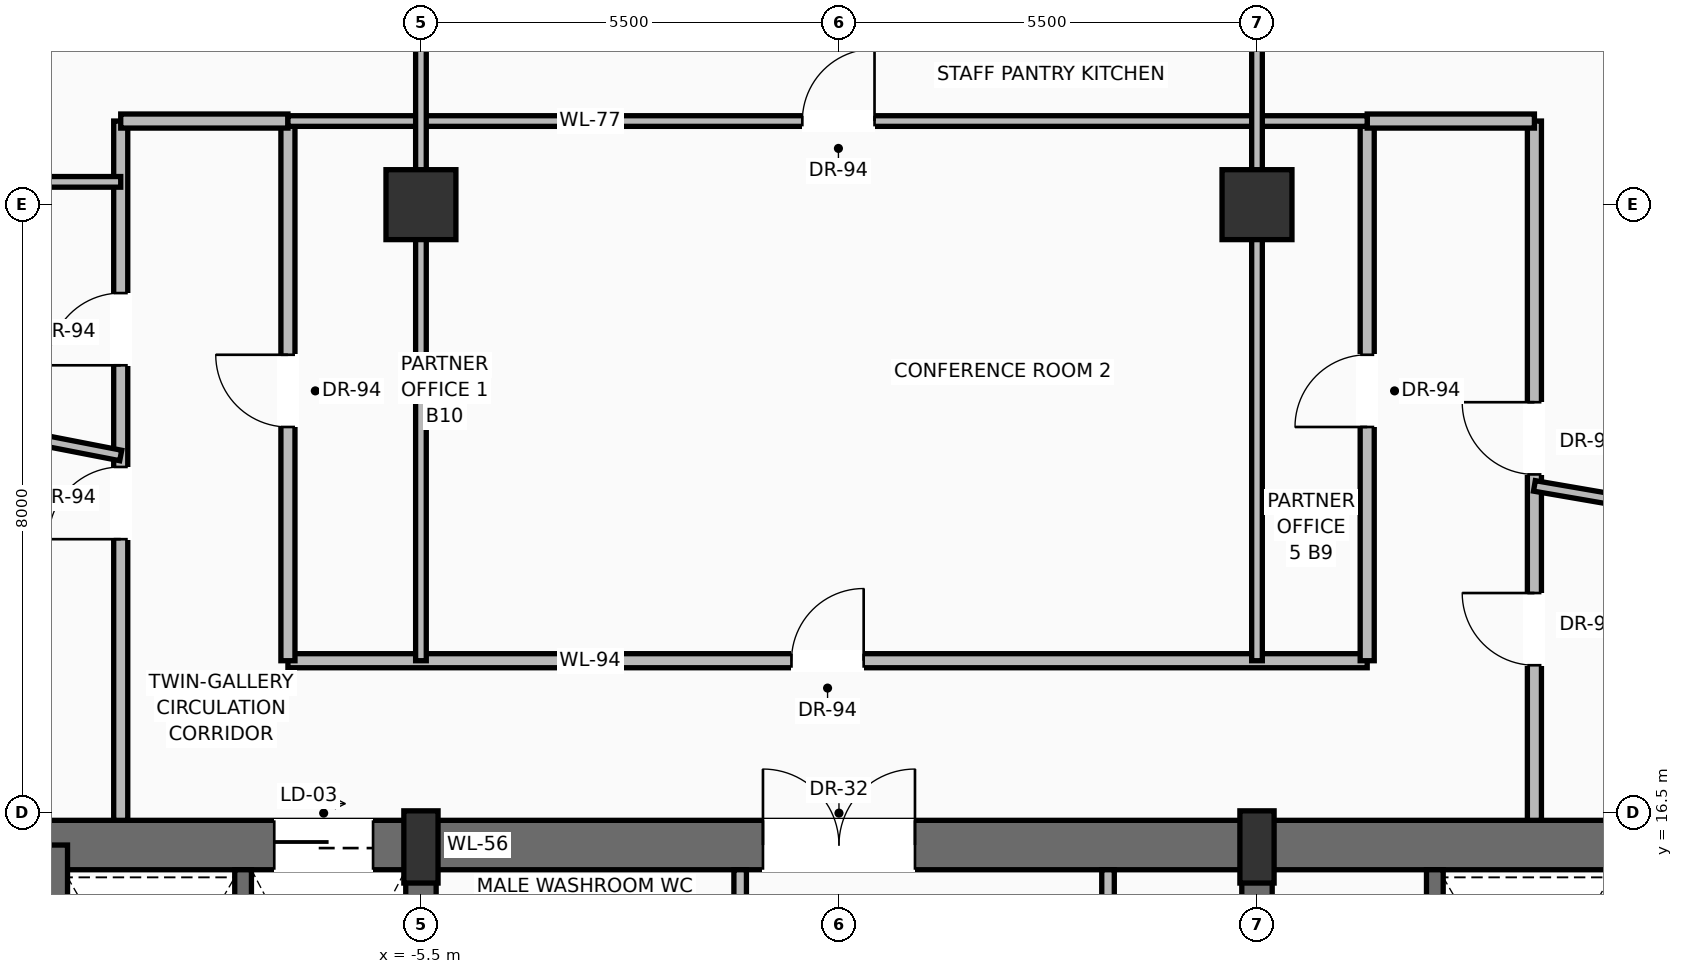
"""IFC4 building model, lengths in metres.
Left out: names, types, materials, properties, quantities, classifications, styles, units other than length and angle.
Written with IfcOpenShell. Run it as: python <this file> out.ifc"""

import sys

from ifc_helpers import new_model, si_unit, direction, frame, frame_2d, origin, origin_2d, place, context, subcontext, project, spatial, rectangle, extrude, source, transform, mapped, element, fill, save


model = new_model("IFC4")
c1 = context("Model", 3, precision=1e-05, world=origin(), true_north=direction((0.0, 1.0)))
c2 = subcontext(c1, "Body", "Model", "MODEL_VIEW")
j1 = project(units=[si_unit("LENGTHUNIT", "METRE"), si_unit("PLANEANGLEUNIT", "RADIAN")], contexts=[c1])
p1 = place(None, origin())
s1 = spatial("IfcSite", under=j1, at=p1, CompositionType="ELEMENT")
p2 = place(p1, origin())
s2 = spatial("IfcBuilding", under=s1, at=p2, CompositionType="ELEMENT")
p3 = place(p2, frame((0.0, 0.0, 182.1)))
s3 = spatial("IfcBuildingStorey", under=s2, at=p3, CompositionType="ELEMENT", Elevation=182.1)
p4 = place(p3, frame((-10.8, 16.075, 0.0), z_axis=(0.0, 0.0, 1.0), x_axis=(1.0, 0.0, 0.0)))
e1 = element("IfcWall", 1, at=p4, inside=s3, PredefinedType="SHEAR", context=c2, shape_type="SweptSolid", body=[
    extrude(rectangle(XDim=21.6, YDim=0.65, at=frame_2d((10.8, 0.0))), origin(), (0.0, 0.0, 1.0), 3.47),
])
p5 = place(p4, frame((3.37, 0.0, 0.0)))
e2 = element("IfcOpeningElement", 2, at=p5, cuts=e1, PredefinedType="OPENING", context=c2, shape_type="SweptSolid", body=[
    extrude(rectangle(XDim=1.3, YDim=2.3, at=frame_2d((0.65, 1.15))), frame((0.0, 0.335, 0.0), z_axis=(0.0, -1.0, 0.0), x_axis=(1.0, 0.0, 0.0)), (0.0, 0.0, 1.0), 0.67),
])
p6 = place(p4, frame((9.8, 0.0, 0.0)))
e3 = element("IfcOpeningElement", 3, at=p6, cuts=e1, PredefinedType="OPENING", context=c2, shape_type="SweptSolid", body=[
    extrude(rectangle(XDim=2.0, YDim=2.4, at=frame_2d((1.0, 1.2))), frame((0.0, 0.335, 0.0), z_axis=(0.0, -1.0, 0.0), x_axis=(1.0, 0.0, 0.0)), (0.0, 0.0, 1.0), 0.67),
])
p7 = place(p3, frame((-10.475, 0.525, 0.0), z_axis=(0.0, 0.0, 1.0), x_axis=(0.0, 1.0, 0.0)))
e4 = element("IfcWall", 4, at=p7, inside=s3, PredefinedType="SHEAR", context=c2, shape_type="SweptSolid", body=[
    extrude(rectangle(XDim=15.55, YDim=0.65, at=frame_2d((7.775, 0.0))), origin(), (0.0, 0.0, 1.0), 3.47),
])
p8 = place(p3, frame((-5.5, 0.525, 0.0), z_axis=(0.0, 0.0, 1.0), x_axis=(0.0, 1.0, 0.0)))
e5 = element("IfcWall", 5, at=p8, inside=s3, PredefinedType="SHEAR", context=c2, shape_type="SweptSolid", body=[
    extrude(rectangle(XDim=15.55, YDim=0.4, at=frame_2d((7.775, 0.0))), origin(), (0.0, 0.0, 1.0), 3.47),
])
p9 = place(p8, frame((8.975, 0.0, 0.0)))
e6 = element("IfcOpeningElement", 6, at=p9, cuts=e5, PredefinedType="OPENING", context=c2, shape_type="SweptSolid", body=[
    extrude(rectangle(XDim=1.1, YDim=2.2, at=frame_2d((0.55, 1.1))), frame((0.0, 0.21, 0.0), z_axis=(0.0, -1.0, 0.0), x_axis=(1.0, 0.0, 0.0)), (0.0, 0.0, 1.0), 0.42),
])
p10 = place(p3, frame((5.5, 0.525, 0.0), z_axis=(0.0, 0.0, 1.0), x_axis=(0.0, 1.0, 0.0)))
e7 = element("IfcWall", 7, at=p10, inside=s3, PredefinedType="SHEAR", context=c2, shape_type="SweptSolid", body=[
    extrude(rectangle(XDim=15.55, YDim=0.4, at=frame_2d((7.775, 0.0))), origin(), (0.0, 0.0, 1.0), 3.47),
])
p11 = place(p10, frame((8.975, 0.0, 0.0)))
e8 = element("IfcOpeningElement", 8, at=p11, cuts=e7, PredefinedType="OPENING", context=c2, shape_type="SweptSolid", body=[
    extrude(rectangle(XDim=1.1, YDim=2.2, at=frame_2d((0.55, 1.1))), frame((0.0, 0.21, 0.0), z_axis=(0.0, -1.0, 0.0), x_axis=(1.0, 0.0, 0.0)), (0.0, 0.0, 1.0), 0.42),
])
m1 = source(origin(), c2, "Body", "SweptSolid", [
    extrude(rectangle(XDim=0.45, YDim=0.95, at=origin_2d()), origin(), (0.0, 0.0, 1.0), 3.7),
])
for number, where, z_axis, x_axis in (
    (9, (-5.5, 16.05, 0.0), (0.0, 0.0, 1.0), (1.0, 0.0, 0.0)),
    (10, (5.5, 16.05, 0.0), (0.0, 0.0, 1.0), (1.0, 0.0, 0.0)),
):
    element("IfcColumn", number, at=place(p3, frame(where, z_axis=z_axis, x_axis=x_axis)), inside=s3, PredefinedType="PILASTER", context=c2, shape_type="MappedRepresentation", body=[
        mapped(m1, transform((0.0, 0.0, 0.0), scale=1.0)),
    ])
m2 = source(origin(), c2, "Body", "SweptSolid", [
    extrude(rectangle(XDim=0.92, YDim=0.92, at=origin_2d()), origin(), (0.0, 0.0, 1.0), 3.7),
])
for number, where, z_axis, x_axis in (
    (11, (-5.5, 24.5, 0.0), (0.0, 0.0, 1.0), (1.0, 0.0, 0.0)),
    (12, (5.5, 24.5, 0.0), (0.0, 0.0, 1.0), (1.0, 0.0, 0.0)),
):
    element("IfcColumn", number, at=place(p3, frame(where, z_axis=z_axis, x_axis=x_axis)), inside=s3, PredefinedType="COLUMN", context=c2, shape_type="MappedRepresentation", body=[
        mapped(m2, transform((0.0, 0.0, 0.0), scale=1.0)),
    ])
p12 = place(p3, frame((-20.423, 16.362, 0.0), z_axis=(0.0, 0.0, 1.0), x_axis=(0.528858297752, 0.848710139505, 0.0)))
e13 = element("IfcWall", 13, at=p12, inside=s3, PredefinedType="SOLIDWALL", context=c2, shape_type="SweptSolid", body=[
    extrude(rectangle(XDim=18.863, YDim=0.28, at=frame_2d((9.431, 0.0))), origin(), (0.0, 0.0, 1.0), 3.05),
])
p13 = place(p12, frame((4.527, 0.0, 0.0)))
e14 = element("IfcOpeningElement", 14, at=p13, cuts=e13, PredefinedType="OPENING", context=c2, shape_type="SweptSolid", body=[
    extrude(rectangle(XDim=1.6, YDim=2.35, at=frame_2d((0.8, 1.175))), frame((0.0, 0.15, 0.0), z_axis=(0.0, -1.0, 0.0), x_axis=(1.0, 0.0, 0.0)), (0.0, 0.0, 1.0), 0.3),
])
p14 = place(p12, frame((12.826, 0.0, 0.9)))
e15 = element("IfcOpeningElement", 15, at=p14, cuts=e13, PredefinedType="OPENING", context=c2, shape_type="SweptSolid", body=[
    extrude(rectangle(XDim=2.0, YDim=1.85, at=frame_2d((1.0, 0.925))), frame((0.0, 0.15, 0.0), z_axis=(0.0, -1.0, 0.0), x_axis=(1.0, 0.0, 0.0)), (0.0, 0.0, 1.0), 0.3),
])
p15 = place(p3, frame((10.054, 32.443, 0.0), z_axis=(0.0, 0.0, 1.0), x_axis=(0.535358537379, -0.844624908735, 0.0)))
e16 = element("IfcWall", 16, at=p15, inside=s3, PredefinedType="SOLIDWALL", context=c2, shape_type="SweptSolid", body=[
    extrude(rectangle(XDim=18.818, YDim=0.28, at=frame_2d((9.409, 0.0))), origin(), (0.0, 0.0, 1.0), 3.05),
])
p16 = place(p15, frame((4.516, 0.0, 0.0)))
e17 = element("IfcOpeningElement", 17, at=p16, cuts=e16, PredefinedType="OPENING", context=c2, shape_type="SweptSolid", body=[
    extrude(rectangle(XDim=1.6, YDim=2.35, at=frame_2d((0.8, 1.175))), frame((0.0, 0.15, 0.0), z_axis=(0.0, -1.0, 0.0), x_axis=(1.0, 0.0, 0.0)), (0.0, 0.0, 1.0), 0.3),
])
p17 = place(p15, frame((12.796, 0.0, 0.9)))
e18 = element("IfcOpeningElement", 18, at=p17, cuts=e16, PredefinedType="OPENING", context=c2, shape_type="SweptSolid", body=[
    extrude(rectangle(XDim=2.0, YDim=1.85, at=frame_2d((1.0, 0.925))), frame((0.0, 0.15, 0.0), z_axis=(0.0, -1.0, 0.0), x_axis=(1.0, 0.0, 0.0)), (0.0, 0.0, 1.0), 0.3),
])
for number, where, z_axis, x_axis in (
    (19, (-7.84, 11.87, 0.0), (0.0, 0.0, 1.0), (0.0, 1.0, 0.0)),
    (20, (7.84, 11.87, 0.0), (0.0, 0.0, 1.0), (0.0, 1.0, 0.0)),
):
    element("IfcWall", number, at=place(p3, frame(where, z_axis=z_axis, x_axis=x_axis)), inside=s3, PredefinedType="SOLIDWALL", context=c2, shape_type="SweptSolid", body=[
        extrude(rectangle(XDim=3.88, YDim=0.22, at=frame_2d((1.94, 0.0))), origin(), (0.0, 0.0, 1.0), 3.47),
    ])
p18 = place(p3, frame((-1.3, 13.6, 0.0), z_axis=(0.0, 0.0, 1.0), x_axis=(0.0, 1.0, 0.0)))
e21 = element("IfcWall", 21, at=p18, inside=s3, PredefinedType="PARTITIONING", context=c2, shape_type="SweptSolid", body=[
    extrude(rectangle(XDim=2.15, YDim=0.165, at=frame_2d((1.075, 0.0))), origin(), (0.0, 0.0, 1.0), 3.462),
])
p19 = place(p18, frame((0.55, 0.0, 0.0)))
e22 = element("IfcOpeningElement", 22, at=p19, cuts=e21, PredefinedType="OPENING", context=c2, shape_type="SweptSolid", body=[
    extrude(rectangle(XDim=0.9, YDim=2.1, at=frame_2d((0.45, 1.05))), frame((0.0, 0.093, 0.0), z_axis=(0.0, -1.0, 0.0), x_axis=(1.0, 0.0, 0.0)), (0.0, 0.0, 1.0), 0.185),
])
p20 = place(p3, frame((3.54, 11.22, 0.0), z_axis=(0.0, 0.0, 1.0), x_axis=(0.0, 1.0, 0.0)))
e23 = element("IfcWall", 23, at=p20, inside=s3, PredefinedType="PARTITIONING", context=c2, shape_type="SweptSolid", body=[
    extrude(rectangle(XDim=4.53, YDim=0.165, at=frame_2d((2.265, 0.0))), origin(), (0.0, 0.0, 1.0), 3.462),
])
p21 = place(p20, frame((1.25, 0.0, 0.0)))
e24 = element("IfcOpeningElement", 24, at=p21, cuts=e23, PredefinedType="OPENING", context=c2, shape_type="SweptSolid", body=[
    extrude(rectangle(XDim=0.9, YDim=2.1, at=frame_2d((0.45, 1.05))), frame((0.0, 0.093, 0.0), z_axis=(0.0, -1.0, 0.0), x_axis=(1.0, 0.0, 0.0)), (0.0, 0.0, 1.0), 0.185),
])
p22 = place(p3, frame((-7.25, 18.5, 0.0), z_axis=(0.0, 0.0, 1.0), x_axis=(1.0, 0.0, 0.0)))
e25 = element("IfcWall", 25, at=p22, inside=s3, PredefinedType="PARTITIONING", context=c2, shape_type="SweptSolid", body=[
    extrude(rectangle(XDim=14.2, YDim=0.185, at=frame_2d((7.1, 0.0))), origin(), (0.0, 0.0, 1.0), 2.846),
])
p23 = place(p22, frame((6.625, 0.0, 0.0)))
e26 = element("IfcOpeningElement", 26, at=p23, cuts=e25, PredefinedType="OPENING", context=c2, shape_type="SweptSolid", body=[
    extrude(rectangle(XDim=0.95, YDim=2.2, at=frame_2d((0.475, 1.1))), frame((0.0, 0.103, 0.0), z_axis=(0.0, -1.0, 0.0), x_axis=(1.0, 0.0, 0.0)), (0.0, 0.0, 1.0), 0.205),
])
p24 = place(p3, frame((-7.25, 18.5, 0.0), z_axis=(0.0, 0.0, 1.0), x_axis=(0.0, 1.0, 0.0)))
e27 = element("IfcWall", 27, at=p24, inside=s3, PredefinedType="PARTITIONING", context=c2, shape_type="SweptSolid", body=[
    extrude(rectangle(XDim=7.1, YDim=0.185, at=frame_2d((3.55, 0.0))), origin(), (0.0, 0.0, 1.0), 2.846),
])
p25 = place(p24, frame((3.075, 0.0, 0.0)))
e28 = element("IfcOpeningElement", 28, at=p25, cuts=e27, PredefinedType="OPENING", context=c2, shape_type="SweptSolid", body=[
    extrude(rectangle(XDim=0.95, YDim=2.2, at=frame_2d((0.475, 1.1))), frame((0.0, 0.103, 0.0), z_axis=(0.0, -1.0, 0.0), x_axis=(1.0, 0.0, 0.0)), (0.0, 0.0, 1.0), 0.205),
])
p26 = place(p3, frame((6.95, 18.5, 0.0), z_axis=(0.0, 0.0, 1.0), x_axis=(0.0, 1.0, 0.0)))
e29 = element("IfcWall", 29, at=p26, inside=s3, PredefinedType="PARTITIONING", context=c2, shape_type="SweptSolid", body=[
    extrude(rectangle(XDim=7.1, YDim=0.185, at=frame_2d((3.55, 0.0))), origin(), (0.0, 0.0, 1.0), 2.846),
])
p27 = place(p26, frame((3.075, 0.0, 0.0)))
e30 = element("IfcOpeningElement", 30, at=p27, cuts=e29, PredefinedType="OPENING", context=c2, shape_type="SweptSolid", body=[
    extrude(rectangle(XDim=0.95, YDim=2.2, at=frame_2d((0.475, 1.1))), frame((0.0, 0.103, 0.0), z_axis=(0.0, -1.0, 0.0), x_axis=(1.0, 0.0, 0.0)), (0.0, 0.0, 1.0), 0.205),
])
p28 = place(p3, frame((-9.45, 16.4, 0.0), z_axis=(0.0, 0.0, 1.0), x_axis=(0.0, 1.0, 0.0)))
e31 = element("IfcWall", 31, at=p28, inside=s3, PredefinedType="PARTITIONING", context=c2, shape_type="SweptSolid", body=[
    extrude(rectangle(XDim=9.2, YDim=0.185, at=frame_2d((4.6, 0.0))), origin(), (0.0, 0.0, 1.0), 2.846),
])
p29 = place(p28, frame((3.699, 0.0, 0.0)))
e32 = element("IfcOpeningElement", 32, at=p29, cuts=e31, PredefinedType="OPENING", context=c2, shape_type="SweptSolid", body=[
    extrude(rectangle(XDim=0.95, YDim=2.2, at=frame_2d((0.475, 1.1))), frame((0.0, 0.103, 0.0), z_axis=(0.0, -1.0, 0.0), x_axis=(1.0, 0.0, 0.0)), (0.0, 0.0, 1.0), 0.205),
])
p30 = place(p28, frame((5.987, 0.0, 0.0)))
e33 = element("IfcOpeningElement", 33, at=p30, cuts=e31, PredefinedType="OPENING", context=c2, shape_type="SweptSolid", body=[
    extrude(rectangle(XDim=0.95, YDim=2.2, at=frame_2d((0.475, 1.1))), frame((0.0, 0.103, 0.0), z_axis=(0.0, -1.0, 0.0), x_axis=(1.0, 0.0, 0.0)), (0.0, 0.0, 1.0), 0.205),
])
p31 = place(p3, frame((9.15, 16.4, 0.0), z_axis=(0.0, 0.0, 1.0), x_axis=(0.0, 1.0, 0.0)))
e34 = element("IfcWall", 34, at=p31, inside=s3, PredefinedType="PARTITIONING", context=c2, shape_type="SweptSolid", body=[
    extrude(rectangle(XDim=9.2, YDim=0.185, at=frame_2d((4.6, 0.0))), origin(), (0.0, 0.0, 1.0), 2.846),
])
p32 = place(p31, frame((4.551, 0.0, 0.0)))
e35 = element("IfcOpeningElement", 35, at=p32, cuts=e34, PredefinedType="OPENING", context=c2, shape_type="SweptSolid", body=[
    extrude(rectangle(XDim=0.95, YDim=2.2, at=frame_2d((0.475, 1.1))), frame((0.0, 0.103, 0.0), z_axis=(0.0, -1.0, 0.0), x_axis=(1.0, 0.0, 0.0)), (0.0, 0.0, 1.0), 0.205),
])
p33 = place(p31, frame((2.041, 0.0, 0.0)))
e36 = element("IfcOpeningElement", 36, at=p33, cuts=e34, PredefinedType="OPENING", context=c2, shape_type="SweptSolid", body=[
    extrude(rectangle(XDim=0.95, YDim=2.2, at=frame_2d((0.475, 1.1))), frame((0.0, 0.103, 0.0), z_axis=(0.0, -1.0, 0.0), x_axis=(1.0, 0.0, 0.0)), (0.0, 0.0, 1.0), 0.205),
])
for number, where, z_axis, x_axis in (
    (37, (-9.45, 25.6, 0.0), (0.0, 0.0, 1.0), (1.0, 0.0, 0.0)),
    (38, (6.95, 25.6, 0.0), (0.0, 0.0, 1.0), (1.0, 0.0, 0.0)),
):
    element("IfcWall", number, at=place(p3, frame(where, z_axis=z_axis, x_axis=x_axis)), inside=s3, PredefinedType="PARTITIONING", context=c2, shape_type="SweptSolid", body=[
        extrude(rectangle(XDim=2.2, YDim=0.185, at=frame_2d((1.1, 0.0))), origin(), (0.0, 0.0, 1.0), 3.462),
    ])
p34 = place(p3, frame((-7.25, 25.6, 0.0), z_axis=(0.0, 0.0, 1.0), x_axis=(1.0, 0.0, 0.0)))
e39 = element("IfcWall", 39, at=p34, inside=s3, PredefinedType="PARTITIONING", context=c2, shape_type="SweptSolid", body=[
    extrude(rectangle(XDim=14.2, YDim=0.14, at=frame_2d((7.1, 0.0))), origin(), (0.0, 0.0, 1.0), 3.462),
])
p35 = place(p34, frame((6.768, 0.0, 0.0)))
e40 = element("IfcOpeningElement", 40, at=p35, cuts=e39, PredefinedType="OPENING", context=c2, shape_type="SweptSolid", body=[
    extrude(rectangle(XDim=0.95, YDim=2.2, at=frame_2d((0.475, 1.1))), frame((0.0, 0.08, 0.0), z_axis=(0.0, -1.0, 0.0), x_axis=(1.0, 0.0, 0.0)), (0.0, 0.0, 1.0), 0.16),
])
for number, where, z_axis, x_axis in (
    (41, (-5.5, 18.5, 0.0), (0.0, 0.0, 1.0), (0.0, 1.0, 0.0)),
    (42, (5.5, 18.5, 0.0), (0.0, 0.0, 1.0), (0.0, 1.0, 0.0)),
):
    element("IfcWall", number, at=place(p3, frame(where, z_axis=z_axis, x_axis=x_axis)), inside=s3, PredefinedType="PARTITIONING", context=c2, shape_type="SweptSolid", body=[
        extrude(rectangle(XDim=14.0, YDim=0.14, at=frame_2d((7.0, 0.0))), origin(), (0.0, 0.0, 1.0), 2.846),
    ])
p36 = place(p3, frame((-16.685, 22.607, 0.0), z_axis=(0.0, 0.0, 1.0), x_axis=(0.981615217267, -0.190870545739, 0.0)))
e43 = element("IfcWall", 43, at=p36, inside=s3, PredefinedType="PARTITIONING", context=c2, shape_type="SweptSolid", body=[
    extrude(rectangle(XDim=7.37, YDim=0.14, at=frame_2d((3.685, 0.0))), origin(), (0.0, 0.0, 1.0), 3.049),
])
p37 = place(p3, frame((-15.318, 24.8, 0.0), z_axis=(0.0, 0.0, 1.0), x_axis=(1.0, 0.0, 0.0)))
e44 = element("IfcWall", 44, at=p37, inside=s3, PredefinedType="PARTITIONING", context=c2, shape_type="SweptSolid", body=[
    extrude(rectangle(XDim=5.868, YDim=0.14, at=frame_2d((2.934, 0.0))), origin(), (0.0, 0.0, 1.0), 3.462),
])
p38 = place(p3, frame((9.15, 20.8, 0.0), z_axis=(0.0, 0.0, 1.0), x_axis=(0.985515802889, -0.169583614351, 0.0)))
e45 = element("IfcWall", 45, at=p38, inside=s3, PredefinedType="PARTITIONING", context=c2, shape_type="SweptSolid", body=[
    extrude(rectangle(XDim=9.61, YDim=0.14, at=frame_2d((4.805, 0.0))), origin(), (0.0, 0.0, 1.0), 3.049),
])
m3 = source(origin(), c2, "Body", "SweptSolid", [
    extrude(rectangle(XDim=1.3, YDim=2.3, at=frame_2d((0.65, 1.15))), frame((0.0, 0.025, 0.0), z_axis=(0.0, -1.0, 0.0), x_axis=(1.0, 0.0, 0.0)), (0.0, 0.0, 1.0), 0.05),
])
p39 = place(p5, origin())
e46 = element("IfcDoor", 46, at=p39, inside=s3, OperationType="SLIDING_TO_RIGHT", PredefinedType="DOOR", context=c2, shape_type="MappedRepresentation", body=[
    mapped(m3, transform((0.0, 0.0, 0.0), scale=1.0)),
])
fill(e2, e46)
m4 = source(origin(), c2, "Body", "SweptSolid", [
    extrude(rectangle(XDim=2.0, YDim=2.4, at=frame_2d((1.0, 1.2))), frame((0.0, 0.025, 0.0), z_axis=(0.0, -1.0, 0.0), x_axis=(1.0, 0.0, 0.0)), (0.0, 0.0, 1.0), 0.05),
])
p40 = place(p6, origin())
e47 = element("IfcDoor", 47, at=p40, inside=s3, OperationType="DOUBLE_DOOR_SINGLE_SWING", PredefinedType="DOOR", context=c2, shape_type="MappedRepresentation", body=[
    mapped(m4, transform((0.0, 0.0, 0.0), scale=1.0)),
])
fill(e3, e47)
m5 = source(origin(), c2, "Body", "SweptSolid", [
    extrude(rectangle(XDim=0.95, YDim=2.2, at=frame_2d((0.475, 1.1))), frame((0.0, 0.025, 0.0), z_axis=(0.0, -1.0, 0.0), x_axis=(1.0, 0.0, 0.0)), (0.0, 0.0, 1.0), 0.05),
])
p41 = place(p23, origin())
e48 = element("IfcDoor", 48, at=p41, inside=s3, OperationType="SINGLE_SWING_RIGHT", PredefinedType="DOOR", context=c2, shape_type="MappedRepresentation", body=[
    mapped(m5, transform((0.0, 0.0, 0.0), scale=1.0)),
])
fill(e26, e48)
p42 = place(p29, origin())
e49 = element("IfcDoor", 49, at=p42, inside=s3, OperationType="SINGLE_SWING_LEFT", PredefinedType="DOOR", context=c2, shape_type="MappedRepresentation", body=[
    mapped(m5, transform((0.0, 0.0, 0.0), scale=1.0)),
])
fill(e32, e49)
p43 = place(p32, origin())
e50 = element("IfcDoor", 50, at=p43, inside=s3, OperationType="SINGLE_SWING_RIGHT", PredefinedType="DOOR", context=c2, shape_type="MappedRepresentation", body=[
    mapped(m5, transform((0.0, 0.0, 0.0), scale=1.0)),
])
fill(e35, e50)
p44 = place(p33, origin())
e51 = element("IfcDoor", 51, at=p44, inside=s3, OperationType="SINGLE_SWING_RIGHT", PredefinedType="DOOR", context=c2, shape_type="MappedRepresentation", body=[
    mapped(m5, transform((0.0, 0.0, 0.0), scale=1.0)),
])
fill(e36, e51)
p45 = place(p27, origin())
e52 = element("IfcDoor", 52, at=p45, inside=s3, OperationType="SINGLE_SWING_LEFT", PredefinedType="DOOR", context=c2, shape_type="MappedRepresentation", body=[
    mapped(m5, transform((0.0, 0.0, 0.0), scale=1.0)),
])
fill(e30, e52)
p46 = place(p25, origin())
e53 = element("IfcDoor", 53, at=p46, inside=s3, OperationType="SINGLE_SWING_RIGHT", PredefinedType="DOOR", context=c2, shape_type="MappedRepresentation", body=[
    mapped(m5, transform((0.0, 0.0, 0.0), scale=1.0)),
])
fill(e28, e53)
p47 = place(p30, origin())
e54 = element("IfcDoor", 54, at=p47, inside=s3, OperationType="SINGLE_SWING_LEFT", PredefinedType="DOOR", context=c2, shape_type="MappedRepresentation", body=[
    mapped(m5, transform((0.0, 0.0, 0.0), scale=1.0)),
])
fill(e33, e54)
p48 = place(p35, origin())
e55 = element("IfcDoor", 55, at=p48, inside=s3, OperationType="SINGLE_SWING_RIGHT", PredefinedType="DOOR", context=c2, shape_type="MappedRepresentation", body=[
    mapped(m5, transform((0.0, 0.0, 0.0), scale=1.0)),
])
fill(e40, e55)
save(model, sys.argv[1])
